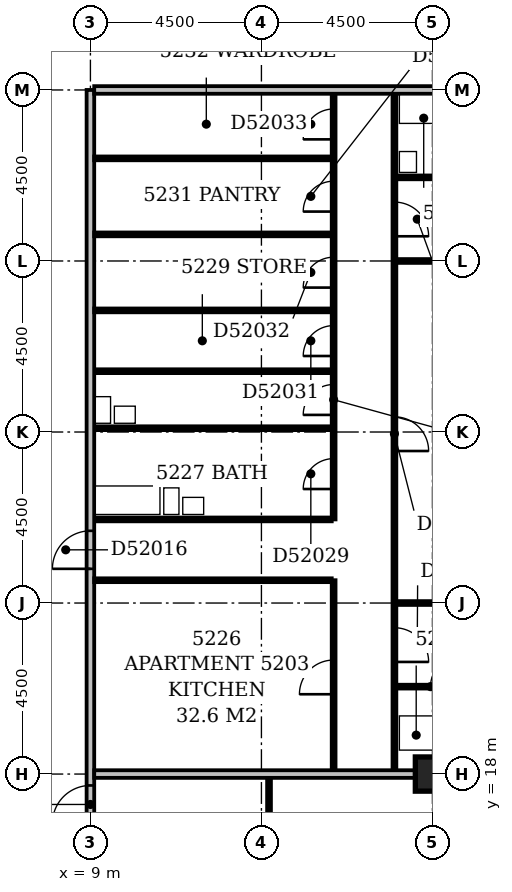
"""IFC4 building model, lengths in metres.
Left out: names, types, materials, properties, quantities, classifications, styles, units other than length and angle.
Written with IfcOpenShell. Run it as: python <this file> out.ifc"""

import sys

from ifc_helpers import new_model, si_unit, direction, frame, frame_2d, origin, origin_2d, place, context, subcontext, project, spatial, rectangle, extrude, element, fill, save


model = new_model("IFC4")
c1 = context("Model", 3, precision=1e-05, world=origin(), true_north=direction((0.0, 1.0)))
c2 = subcontext(c1, "Body", "Model", "MODEL_VIEW")
j1 = project(units=[si_unit("LENGTHUNIT", "METRE"), si_unit("PLANEANGLEUNIT", "RADIAN")], contexts=[c1])
p1 = place(None, origin())
s1 = spatial("IfcSite", under=j1, at=p1, CompositionType="ELEMENT")
p2 = place(p1, origin())
s2 = spatial("IfcBuilding", under=s1, at=p2, CompositionType="ELEMENT")
p3 = place(p2, frame((0.0, 0.0, 204.2)))
s3 = spatial("IfcBuildingStorey", under=s2, at=p3, CompositionType="ELEMENT", Elevation=204.2)
p4 = place(p3, frame((18.0, 18.0, -0.3), z_axis=(0.0, 0.0, 1.0), x_axis=(1.0, 0.0, 0.0)))
e1 = element("IfcColumn", 1, at=p4, inside=s3, PredefinedType="COLUMN", context=c2, shape_type="SweptSolid", body=[
    extrude(rectangle(XDim=0.9, YDim=0.9, at=origin_2d()), origin(), (0.0, 0.0, 1.0), 3.6),
])
p5 = place(p3, frame((9.0, 5.0, 0.0), z_axis=(0.0, 0.0, 1.0), x_axis=(0.0, 1.0, 0.0)))
e2 = element("IfcWall", 2, at=p5, inside=s3, PredefinedType="PARTITIONING", context=c2, shape_type="SweptSolid", body=[
    extrude(rectangle(XDim=31.0, YDim=0.2, at=frame_2d((15.5, 0.0))), origin(), (0.0, 0.0, 1.0), 3.3),
])
p6 = place(p5, frame((18.4, 0.0, 0.0)))
e3 = element("IfcOpeningElement", 3, at=p6, cuts=e2, PredefinedType="OPENING", context=c2, shape_type="SweptSolid", body=[
    extrude(rectangle(XDim=1.0, YDim=2.1, at=frame_2d((0.5, 1.05))), frame((0.0, 0.112, 0.0), z_axis=(0.0, -1.0, 0.0), x_axis=(1.0, 0.0, 0.0)), (0.0, 0.0, 1.0), 0.224),
])
p7 = place(p5, frame((11.7, 0.0, 0.0)))
e4 = element("IfcOpeningElement", 4, at=p7, cuts=e2, PredefinedType="OPENING", context=c2, shape_type="SweptSolid", body=[
    extrude(rectangle(XDim=1.0, YDim=2.1, at=frame_2d((0.5, 1.05))), frame((0.0, 0.112, 0.0), z_axis=(0.0, -1.0, 0.0), x_axis=(1.0, 0.0, 0.0)), (0.0, 0.0, 1.0), 0.224),
])
p8 = place(p5, frame((1.5, 0.0, 0.0)))
e5 = element("IfcOpeningElement", 5, at=p8, cuts=e2, PredefinedType="OPENING", context=c2, shape_type="SweptSolid", body=[
    extrude(rectangle(XDim=0.9, YDim=2.1, at=frame_2d((0.45, 1.05))), frame((0.0, 0.112, 0.0), z_axis=(0.0, -1.0, 0.0), x_axis=(1.0, 0.0, 0.0)), (0.0, 0.0, 1.0), 0.224),
])
p9 = place(p3, frame((13.7, 9.45, 0.0), z_axis=(0.0, 0.0, 1.0), x_axis=(0.0, 1.0, 0.0)))
e6 = element("IfcWall", 6, at=p9, inside=s3, PredefinedType="PARTITIONING", context=c2, shape_type="SweptSolid", body=[
    extrude(rectangle(XDim=8.45, YDim=0.1, at=frame_2d((4.225, 0.0))), origin(), (0.0, 0.0, 1.0), 3.3),
])
p10 = place(p9, frame((1.35, 0.0, 0.0)))
e7 = element("IfcOpeningElement", 7, at=p10, cuts=e6, PredefinedType="OPENING", context=c2, shape_type="SweptSolid", body=[
    extrude(rectangle(XDim=0.9, YDim=2.1, at=frame_2d((0.45, 1.05))), frame((0.0, 0.062, 0.0), z_axis=(0.0, -1.0, 0.0), x_axis=(1.0, 0.0, 0.0)), (0.0, 0.0, 1.0), 0.124),
])
p11 = place(p9, frame((5.85, 0.0, 0.0)))
e8 = element("IfcOpeningElement", 8, at=p11, cuts=e6, PredefinedType="OPENING", context=c2, shape_type="SweptSolid", body=[
    extrude(rectangle(XDim=0.9, YDim=2.1, at=frame_2d((0.45, 1.05))), frame((0.0, 0.062, 0.0), z_axis=(0.0, -1.0, 0.0), x_axis=(1.0, 0.0, 0.0)), (0.0, 0.0, 1.0), 0.124),
])
p12 = place(p3, frame((9.1, 18.0, 0.0), z_axis=(0.0, 0.0, 1.0), x_axis=(1.0, 0.0, 0.0)))
e9 = element("IfcWall", 9, at=p12, inside=s3, PredefinedType="PARTITIONING", context=c2, shape_type="SweptSolid", body=[
    extrude(rectangle(XDim=8.45, YDim=0.2, at=frame_2d((4.225, 0.0))), origin(), (0.0, 0.0, 1.0), 2.6),
])
p13 = place(p3, frame((15.4, 18.1, 0.0), z_axis=(0.0, 0.0, 1.0), x_axis=(0.0, 1.0, 0.0)))
e10 = element("IfcWall", 10, at=p13, inside=s3, PredefinedType="PARTITIONING", context=c2, shape_type="SweptSolid", body=[
    extrude(rectangle(XDim=5.0, YDim=0.1, at=frame_2d((2.5, 0.0))), origin(), (0.0, 0.0, 1.0), 3.3),
])
p14 = place(p13, frame((2.0, 0.0, 0.0)))
e11 = element("IfcOpeningElement", 11, at=p14, cuts=e10, PredefinedType="OPENING", context=c2, shape_type="SweptSolid", body=[
    extrude(rectangle(XDim=0.9, YDim=2.1, at=frame_2d((0.45, 1.05))), frame((0.0, 0.062, 0.0), z_axis=(0.0, -1.0, 0.0), x_axis=(1.0, 0.0, 0.0)), (0.0, 0.0, 1.0), 0.124),
])
p15 = place(p3, frame((17.0, 18.1, 0.0), z_axis=(0.0, 0.0, 1.0), x_axis=(0.0, 1.0, 0.0)))
e12 = element("IfcWall", 12, at=p15, inside=s3, PredefinedType="PARTITIONING", context=c2, shape_type="SweptSolid", body=[
    extrude(rectangle(XDim=17.8, YDim=0.1, at=frame_2d((8.9, 0.0))), origin(), (0.0, 0.0, 1.0), 3.3),
])
p16 = place(p15, frame((2.85, 0.0, 0.0)))
e13 = element("IfcOpeningElement", 13, at=p16, cuts=e12, PredefinedType="OPENING", context=c2, shape_type="SweptSolid", body=[
    extrude(rectangle(XDim=0.9, YDim=2.1, at=frame_2d((0.45, 1.05))), frame((0.0, 0.062, 0.0), z_axis=(0.0, -1.0, 0.0), x_axis=(1.0, 0.0, 0.0)), (0.0, 0.0, 1.0), 0.124),
])
p17 = place(p15, frame((8.4, 0.0, 0.0)))
e14 = element("IfcOpeningElement", 14, at=p17, cuts=e12, PredefinedType="OPENING", context=c2, shape_type="SweptSolid", body=[
    extrude(rectangle(XDim=0.9, YDim=2.1, at=frame_2d((0.45, 1.05))), frame((0.0, 0.062, 0.0), z_axis=(0.0, -1.0, 0.0), x_axis=(1.0, 0.0, 0.0)), (0.0, 0.0, 1.0), 0.124),
])
p18 = place(p15, frame((14.05, 0.0, 0.0)))
e15 = element("IfcOpeningElement", 15, at=p18, cuts=e12, PredefinedType="OPENING", context=c2, shape_type="SweptSolid", body=[
    extrude(rectangle(XDim=0.9, YDim=2.1, at=frame_2d((0.45, 1.05))), frame((0.0, 0.062, 0.0), z_axis=(0.0, -1.0, 0.0), x_axis=(1.0, 0.0, 0.0)), (0.0, 0.0, 1.0), 0.124),
])
p19 = place(p3, frame((17.05, 20.3, 0.0), z_axis=(0.0, 0.0, 1.0), x_axis=(1.0, 0.0, 0.0)))
e16 = element("IfcWall", 16, at=p19, inside=s3, PredefinedType="PLUMBINGWALL", context=c2, shape_type="SweptSolid", body=[
    extrude(rectangle(XDim=1.8, YDim=0.1, at=frame_2d((0.9, 0.0))), origin(), (0.0, 0.0, 1.0), 3.3),
])
p20 = place(p19, frame((0.9, 0.0, 0.0)))
e17 = element("IfcOpeningElement", 17, at=p20, cuts=e16, PredefinedType="OPENING", context=c2, shape_type="SweptSolid", body=[
    extrude(rectangle(XDim=0.8, YDim=2.1, at=frame_2d((0.4, 1.05))), frame((0.0, 0.062, 0.0), z_axis=(0.0, -1.0, 0.0), x_axis=(1.0, 0.0, 0.0)), (0.0, 0.0, 1.0), 0.124),
])
p21 = place(p3, frame((17.05, 22.5, 0.0), z_axis=(0.0, 0.0, 1.0), x_axis=(1.0, 0.0, 0.0)))
e18 = element("IfcWall", 18, at=p21, inside=s3, PredefinedType="PARTITIONING", context=c2, shape_type="SweptSolid", body=[
    extrude(rectangle(XDim=5.0, YDim=0.1, at=frame_2d((2.5, 0.0))), origin(), (0.0, 0.0, 1.0), 3.3),
])
p22 = place(p3, frame((9.1, 23.1, 0.0), z_axis=(0.0, 0.0, 1.0), x_axis=(1.0, 0.0, 0.0)))
e19 = element("IfcWall", 19, at=p22, inside=s3, PredefinedType="PARTITIONING", context=c2, shape_type="SweptSolid", body=[
    extrude(rectangle(XDim=6.25, YDim=0.1, at=frame_2d((3.125, 0.0))), origin(), (0.0, 0.0, 1.0), 3.3),
])
p23 = place(p3, frame((9.1, 24.7, 0.0), z_axis=(0.0, 0.0, 1.0), x_axis=(1.0, 0.0, 0.0)))
e20 = element("IfcWall", 20, at=p23, inside=s3, PredefinedType="PLUMBINGWALL", context=c2, shape_type="SweptSolid", body=[
    extrude(rectangle(XDim=6.25, YDim=0.1, at=frame_2d((3.125, 0.0))), origin(), (0.0, 0.0, 1.0), 3.3),
])
p24 = place(p3, frame((15.4, 24.7, 0.0), z_axis=(0.0, 0.0, 1.0), x_axis=(0.0, 1.0, 0.0)))
e21 = element("IfcWall", 21, at=p24, inside=s3, PredefinedType="PARTITIONING", context=c2, shape_type="SweptSolid", body=[
    extrude(rectangle(XDim=11.2, YDim=0.1, at=frame_2d((5.6, 0.0))), origin(), (0.0, 0.0, 1.0), 3.3),
])
p25 = place(p24, frame((0.8, 0.0, 0.0)))
e22 = element("IfcOpeningElement", 22, at=p25, cuts=e21, PredefinedType="OPENING", context=c2, shape_type="SweptSolid", body=[
    extrude(rectangle(XDim=0.8, YDim=2.1, at=frame_2d((0.4, 1.05))), frame((0.0, 0.062, 0.0), z_axis=(0.0, -1.0, 0.0), x_axis=(1.0, 0.0, 0.0)), (0.0, 0.0, 1.0), 0.124),
])
p26 = place(p24, frame((8.1, 0.0, 0.0)))
e23 = element("IfcOpeningElement", 23, at=p26, cuts=e21, PredefinedType="OPENING", context=c2, shape_type="SweptSolid", body=[
    extrude(rectangle(XDim=0.8, YDim=2.1, at=frame_2d((0.4, 1.05))), frame((0.0, 0.062, 0.0), z_axis=(0.0, -1.0, 0.0), x_axis=(1.0, 0.0, 0.0)), (0.0, 0.0, 1.0), 0.124),
])
p27 = place(p24, frame((4.3, 0.0, 0.0)))
e24 = element("IfcOpeningElement", 24, at=p27, cuts=e21, PredefinedType="OPENING", context=c2, shape_type="SweptSolid", body=[
    extrude(rectangle(XDim=0.8, YDim=2.1, at=frame_2d((0.4, 1.05))), frame((0.0, 0.062, 0.0), z_axis=(0.0, -1.0, 0.0), x_axis=(1.0, 0.0, 0.0)), (0.0, 0.0, 1.0), 0.124),
])
p28 = place(p24, frame((6.1, 0.0, 0.0)))
e25 = element("IfcOpeningElement", 25, at=p28, cuts=e21, PredefinedType="OPENING", context=c2, shape_type="SweptSolid", body=[
    extrude(rectangle(XDim=0.8, YDim=2.1, at=frame_2d((0.4, 1.05))), frame((0.0, 0.062, 0.0), z_axis=(0.0, -1.0, 0.0), x_axis=(1.0, 0.0, 0.0)), (0.0, 0.0, 1.0), 0.124),
])
p29 = place(p24, frame((10.0, 0.0, 0.0)))
e26 = element("IfcOpeningElement", 26, at=p29, cuts=e21, PredefinedType="OPENING", context=c2, shape_type="SweptSolid", body=[
    extrude(rectangle(XDim=0.8, YDim=2.1, at=frame_2d((0.4, 1.05))), frame((0.0, 0.062, 0.0), z_axis=(0.0, -1.0, 0.0), x_axis=(1.0, 0.0, 0.0)), (0.0, 0.0, 1.0), 0.124),
])
p30 = place(p24, frame((2.75, 0.0, 0.0)))
e27 = element("IfcOpeningElement", 27, at=p30, cuts=e21, PredefinedType="OPENING", context=c2, shape_type="SweptSolid", body=[
    extrude(rectangle(XDim=0.8, YDim=2.1, at=frame_2d((0.4, 1.05))), frame((0.0, 0.062, 0.0), z_axis=(0.0, -1.0, 0.0), x_axis=(1.0, 0.0, 0.0)), (0.0, 0.0, 1.0), 0.124),
])
p31 = place(p3, frame((9.1, 27.1, 0.0), z_axis=(0.0, 0.0, 1.0), x_axis=(1.0, 0.0, 0.0)))
e28 = element("IfcWall", 28, at=p31, inside=s3, PredefinedType="PLUMBINGWALL", context=c2, shape_type="SweptSolid", body=[
    extrude(rectangle(XDim=6.25, YDim=0.1, at=frame_2d((3.125, 0.0))), origin(), (0.0, 0.0, 1.0), 2.7),
])
p32 = place(p3, frame((9.1, 28.6, 0.0), z_axis=(0.0, 0.0, 1.0), x_axis=(1.0, 0.0, 0.0)))
e29 = element("IfcWall", 29, at=p32, inside=s3, PredefinedType="PLUMBINGWALL", context=c2, shape_type="SweptSolid", body=[
    extrude(rectangle(XDim=6.25, YDim=0.1, at=frame_2d((3.125, 0.0))), origin(), (0.0, 0.0, 1.0), 3.3),
])
p33 = place(p3, frame((9.1, 30.2, 0.0), z_axis=(0.0, 0.0, 1.0), x_axis=(1.0, 0.0, 0.0)))
e30 = element("IfcWall", 30, at=p33, inside=s3, PredefinedType="PARTITIONING", context=c2, shape_type="SweptSolid", body=[
    extrude(rectangle(XDim=6.25, YDim=0.1, at=frame_2d((3.125, 0.0))), origin(), (0.0, 0.0, 1.0), 3.3),
])
p34 = place(p3, frame((17.05, 31.5, 0.0), z_axis=(0.0, 0.0, 1.0), x_axis=(1.0, 0.0, 0.0)))
e31 = element("IfcWall", 31, at=p34, inside=s3, PredefinedType="PARTITIONING", context=c2, shape_type="SweptSolid", body=[
    extrude(rectangle(XDim=5.0, YDim=0.1, at=frame_2d((2.5, 0.0))), origin(), (0.0, 0.0, 1.0), 3.3),
])
p35 = place(p3, frame((9.1, 32.2, 0.0), z_axis=(0.0, 0.0, 1.0), x_axis=(1.0, 0.0, 0.0)))
e32 = element("IfcWall", 32, at=p35, inside=s3, PredefinedType="PARTITIONING", context=c2, shape_type="SweptSolid", body=[
    extrude(rectangle(XDim=6.25, YDim=0.1, at=frame_2d((3.125, 0.0))), origin(), (0.0, 0.0, 1.0), 3.3),
])
p36 = place(p3, frame((17.05, 33.7, 0.0), z_axis=(0.0, 0.0, 1.0), x_axis=(1.0, 0.0, 0.0)))
e33 = element("IfcWall", 33, at=p36, inside=s3, PredefinedType="PLUMBINGWALL", context=c2, shape_type="SweptSolid", body=[
    extrude(rectangle(XDim=2.8, YDim=0.1, at=frame_2d((1.4, 0.0))), origin(), (0.0, 0.0, 1.0), 3.3),
])
p37 = place(p36, frame((1.0, 0.0, 0.0)))
e34 = element("IfcOpeningElement", 34, at=p37, cuts=e33, PredefinedType="OPENING", context=c2, shape_type="SweptSolid", body=[
    extrude(rectangle(XDim=0.8, YDim=2.1, at=frame_2d((0.4, 1.05))), frame((0.0, 0.062, 0.0), z_axis=(0.0, -1.0, 0.0), x_axis=(1.0, 0.0, 0.0)), (0.0, 0.0, 1.0), 0.124),
])
p38 = place(p3, frame((9.1, 34.2, 0.0), z_axis=(0.0, 0.0, 1.0), x_axis=(1.0, 0.0, 0.0)))
e35 = element("IfcWall", 35, at=p38, inside=s3, PredefinedType="PARTITIONING", context=c2, shape_type="SweptSolid", body=[
    extrude(rectangle(XDim=6.25, YDim=0.1, at=frame_2d((3.125, 0.0))), origin(), (0.0, 0.0, 1.0), 3.3),
])
p39 = place(p3, frame((9.1, 36.0, 0.0), z_axis=(0.0, 0.0, 1.0), x_axis=(1.0, 0.0, 0.0)))
e36 = element("IfcWall", 36, at=p39, inside=s3, PredefinedType="PARTITIONING", context=c2, shape_type="SweptSolid", body=[
    extrude(rectangle(XDim=12.95, YDim=0.2, at=frame_2d((6.475, 0.0))), origin(), (0.0, 0.0, 1.0), 3.3),
])
p40 = place(p6, origin())
e37 = element("IfcDoor", 37, at=p40, inside=s3, OperationType="SINGLE_SWING_LEFT", PredefinedType="DOOR", context=c2, shape_type="SweptSolid", body=[
    extrude(rectangle(XDim=1.0, YDim=2.1, at=frame_2d((0.5, 1.05))), frame((0.0, 0.025, 0.0), z_axis=(0.0, -1.0, 0.0), x_axis=(1.0, 0.0, 0.0)), (0.0, 0.0, 1.0), 0.05),
])
fill(e3, e37)
p41 = place(p7, origin())
e38 = element("IfcDoor", 38, at=p41, inside=s3, OperationType="SINGLE_SWING_LEFT", PredefinedType="DOOR", context=c2, shape_type="SweptSolid", body=[
    extrude(rectangle(XDim=1.0, YDim=2.1, at=frame_2d((0.5, 1.05))), frame((0.0, 0.025, 0.0), z_axis=(0.0, -1.0, 0.0), x_axis=(1.0, 0.0, 0.0)), (0.0, 0.0, 1.0), 0.05),
])
fill(e4, e38)
p42 = place(p14, origin())
e39 = element("IfcDoor", 39, at=p42, inside=s3, OperationType="SINGLE_SWING_LEFT", PredefinedType="DOOR", context=c2, shape_type="SweptSolid", body=[
    extrude(rectangle(XDim=0.9, YDim=2.1, at=frame_2d((0.45, 1.05))), frame((0.0, 0.025, 0.0), z_axis=(0.0, -1.0, 0.0), x_axis=(1.0, 0.0, 0.0)), (0.0, 0.0, 1.0), 0.05),
])
fill(e11, e39)
p43 = place(p16, frame((0.9, 0.0, 0.0), z_axis=(0.0, 0.0, 1.0), x_axis=(-1.0, 0.0, 0.0)))
e40 = element("IfcDoor", 40, at=p43, inside=s3, OperationType="SINGLE_SWING_RIGHT", PredefinedType="DOOR", context=c2, shape_type="SweptSolid", body=[
    extrude(rectangle(XDim=0.9, YDim=2.1, at=frame_2d((0.45, 1.05))), frame((0.0, 0.025, 0.0), z_axis=(0.0, -1.0, 0.0), x_axis=(1.0, 0.0, 0.0)), (0.0, 0.0, 1.0), 0.05),
])
fill(e13, e40)
p44 = place(p17, frame((0.9, 0.0, 0.0), z_axis=(0.0, 0.0, 1.0), x_axis=(-1.0, 0.0, 0.0)))
e41 = element("IfcDoor", 41, at=p44, inside=s3, OperationType="SINGLE_SWING_RIGHT", PredefinedType="DOOR", context=c2, shape_type="SweptSolid", body=[
    extrude(rectangle(XDim=0.9, YDim=2.1, at=frame_2d((0.45, 1.05))), frame((0.0, 0.025, 0.0), z_axis=(0.0, -1.0, 0.0), x_axis=(1.0, 0.0, 0.0)), (0.0, 0.0, 1.0), 0.05),
])
fill(e14, e41)
p45 = place(p18, frame((0.9, 0.0, 0.0), z_axis=(0.0, 0.0, 1.0), x_axis=(-1.0, 0.0, 0.0)))
e42 = element("IfcDoor", 42, at=p45, inside=s3, OperationType="SINGLE_SWING_RIGHT", PredefinedType="DOOR", context=c2, shape_type="SweptSolid", body=[
    extrude(rectangle(XDim=0.9, YDim=2.1, at=frame_2d((0.45, 1.05))), frame((0.0, 0.025, 0.0), z_axis=(0.0, -1.0, 0.0), x_axis=(1.0, 0.0, 0.0)), (0.0, 0.0, 1.0), 0.05),
])
fill(e15, e42)
p46 = place(p20, frame((0.8, 0.0, 0.0), z_axis=(0.0, 0.0, 1.0), x_axis=(-1.0, 0.0, 0.0)))
e43 = element("IfcDoor", 43, at=p46, inside=s3, OperationType="SINGLE_SWING_LEFT", PredefinedType="DOOR", context=c2, shape_type="SweptSolid", body=[
    extrude(rectangle(XDim=0.8, YDim=2.1, at=frame_2d((0.4, 1.05))), frame((0.0, 0.025, 0.0), z_axis=(0.0, -1.0, 0.0), x_axis=(1.0, 0.0, 0.0)), (0.0, 0.0, 1.0), 0.05),
])
fill(e17, e43)
p47 = place(p25, origin())
e44 = element("IfcDoor", 44, at=p47, inside=s3, OperationType="SINGLE_SWING_LEFT", PredefinedType="DOOR", context=c2, shape_type="SweptSolid", body=[
    extrude(rectangle(XDim=0.8, YDim=2.1, at=frame_2d((0.4, 1.05))), frame((0.0, 0.025, 0.0), z_axis=(0.0, -1.0, 0.0), x_axis=(1.0, 0.0, 0.0)), (0.0, 0.0, 1.0), 0.05),
])
fill(e22, e44)
p48 = place(p26, origin())
e45 = element("IfcDoor", 45, at=p48, inside=s3, OperationType="SINGLE_SWING_LEFT", PredefinedType="DOOR", context=c2, shape_type="SweptSolid", body=[
    extrude(rectangle(XDim=0.8, YDim=2.1, at=frame_2d((0.4, 1.05))), frame((0.0, 0.025, 0.0), z_axis=(0.0, -1.0, 0.0), x_axis=(1.0, 0.0, 0.0)), (0.0, 0.0, 1.0), 0.05),
])
fill(e23, e45)
p49 = place(p27, origin())
e46 = element("IfcDoor", 46, at=p49, inside=s3, OperationType="SINGLE_SWING_LEFT", PredefinedType="DOOR", context=c2, shape_type="SweptSolid", body=[
    extrude(rectangle(XDim=0.8, YDim=2.1, at=frame_2d((0.4, 1.05))), frame((0.0, 0.025, 0.0), z_axis=(0.0, -1.0, 0.0), x_axis=(1.0, 0.0, 0.0)), (0.0, 0.0, 1.0), 0.05),
])
fill(e24, e46)
p50 = place(p28, origin())
e47 = element("IfcDoor", 47, at=p50, inside=s3, OperationType="SINGLE_SWING_LEFT", PredefinedType="DOOR", context=c2, shape_type="SweptSolid", body=[
    extrude(rectangle(XDim=0.8, YDim=2.1, at=frame_2d((0.4, 1.05))), frame((0.0, 0.025, 0.0), z_axis=(0.0, -1.0, 0.0), x_axis=(1.0, 0.0, 0.0)), (0.0, 0.0, 1.0), 0.05),
])
fill(e25, e47)
p51 = place(p29, origin())
e48 = element("IfcDoor", 48, at=p51, inside=s3, OperationType="SINGLE_SWING_LEFT", PredefinedType="DOOR", context=c2, shape_type="SweptSolid", body=[
    extrude(rectangle(XDim=0.8, YDim=2.1, at=frame_2d((0.4, 1.05))), frame((0.0, 0.025, 0.0), z_axis=(0.0, -1.0, 0.0), x_axis=(1.0, 0.0, 0.0)), (0.0, 0.0, 1.0), 0.05),
])
fill(e26, e48)
p52 = place(p30, origin())
e49 = element("IfcDoor", 49, at=p52, inside=s3, OperationType="SINGLE_SWING_LEFT", PredefinedType="DOOR", context=c2, shape_type="SweptSolid", body=[
    extrude(rectangle(XDim=0.8, YDim=2.1, at=frame_2d((0.4, 1.05))), frame((0.0, 0.025, 0.0), z_axis=(0.0, -1.0, 0.0), x_axis=(1.0, 0.0, 0.0)), (0.0, 0.0, 1.0), 0.05),
])
fill(e27, e49)
save(model, sys.argv[1])
